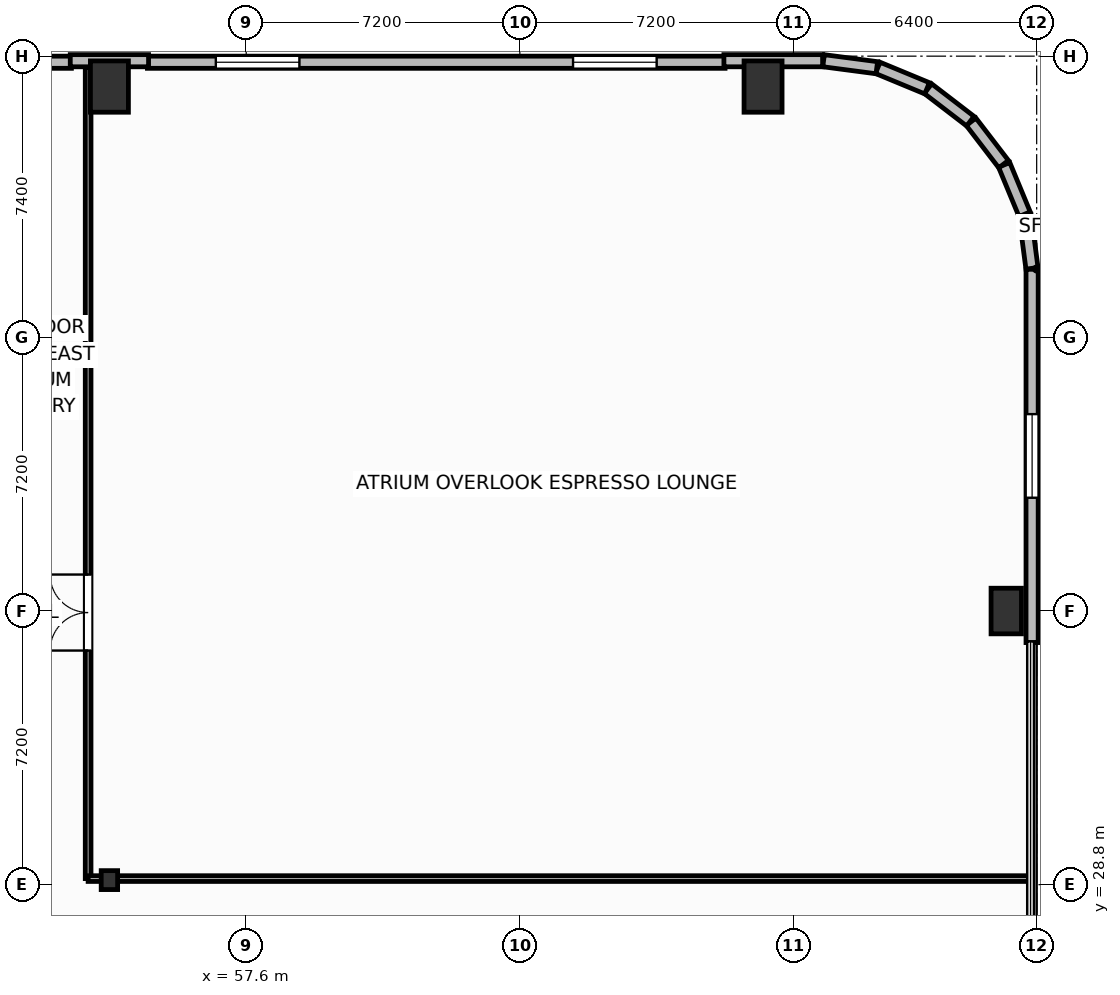
"""IFC4 building model, lengths in metres.
Left out: names, types, materials, properties, quantities, classifications, styles, units other than length and angle.
Written with IfcOpenShell. Run it as: python <this file> out.ifc"""

import sys

from ifc_helpers import new_model, si_unit, direction, frame, frame_2d, origin, origin_2d, place, context, subcontext, project, spatial, rectangle, i_section, extrude, element, fill, save


model = new_model("IFC4")
c1 = context("Model", 3, precision=1e-05, world=origin(), true_north=direction((0.0, 1.0)))
c2 = subcontext(c1, "Body", "Model", "MODEL_VIEW")
j1 = project(units=[si_unit("LENGTHUNIT", "METRE"), si_unit("PLANEANGLEUNIT", "RADIAN")], contexts=[c1])
p1 = place(None, origin())
s1 = spatial("IfcSite", under=j1, at=p1, CompositionType="ELEMENT")
p2 = place(p1, origin())
s2 = spatial("IfcBuilding", under=s1, at=p2, CompositionType="ELEMENT")
p3 = place(p2, frame((0.0, 0.0, 5.4)))
s3 = spatial("IfcBuildingStorey", under=s2, at=p3, CompositionType="ELEMENT", Elevation=5.4)
p4 = place(p3, frame((54.0, 28.92, 0.0), z_axis=(0.0, 0.0, 1.0), x_axis=(1.0, 0.0, 0.0)))
e1 = element("IfcColumn", 1, at=p4, inside=s3, PredefinedType="COLUMN", context=c2, shape_type="SweptSolid", body=[
    extrude(i_section(OverallWidth=0.432, OverallDepth=0.498, WebThickness=0.056, FlangeThickness=0.089, FilletRadius=0.025, at=origin_2d()), origin(), (0.0, 0.0, 1.0), 5.4),
])
for number, where, z_axis, x_axis in (
    (2, (54.0, 49.8, 0.0), (0.0, 0.0, 1.0), (1.0, 0.0, 0.0)),
    (3, (71.2, 49.8, 0.0), (0.0, 0.0, 1.0), (1.0, 0.0, 0.0)),
):
    element("IfcColumn", number, at=place(p3, frame(where, z_axis=z_axis, x_axis=x_axis)), inside=s3, PredefinedType="COLUMN", context=c2, shape_type="SweptSolid", body=[
        extrude(rectangle(XDim=1.0, YDim=1.35, at=origin_2d()), origin(), (0.0, 0.0, 1.0), 5.4),
    ])
p5 = place(p3, frame((77.6, 36.0, 0.0), z_axis=(0.0, 0.0, 1.0), x_axis=(1.0, 0.0, 0.0)))
e4 = element("IfcColumn", 4, at=p5, inside=s3, PredefinedType="PILASTER", context=c2, shape_type="SweptSolid", body=[
    extrude(rectangle(XDim=0.8, YDim=1.2, at=origin_2d()), origin(), (0.0, 0.0, 1.0), 5.4),
])
p6 = place(p3, frame((25.4, 50.44, 0.0), z_axis=(0.0, 0.0, 1.0), x_axis=(1.0, 0.0, 0.0)))
e5 = element("IfcWall", 5, at=p6, inside=s3, PredefinedType="SOLIDWALL", context=c2, shape_type="SweptSolid", body=[
    extrude(rectangle(XDim=27.6, YDim=0.32, at=frame_2d((13.8, 0.0))), origin(), (0.0, 0.0, 1.0), 4.07),
])
p7 = place(p6, frame((1.8, 0.0, 0.8)))
e6 = element("IfcOpeningElement", 6, at=p7, cuts=e5, PredefinedType="OPENING", context=c2, shape_type="SweptSolid", body=[
    extrude(rectangle(XDim=2.2, YDim=1.85, at=frame_2d((1.1, 0.925))), frame((0.0, 0.17, 0.0), z_axis=(0.0, -1.0, 0.0), x_axis=(1.0, 0.0, 0.0)), (0.0, 0.0, 1.0), 0.34),
])
p8 = place(p6, frame((23.6, 0.0, 0.8)))
e7 = element("IfcOpeningElement", 7, at=p8, cuts=e5, PredefinedType="OPENING", context=c2, shape_type="SweptSolid", body=[
    extrude(rectangle(XDim=2.2, YDim=1.85, at=frame_2d((1.1, 0.925))), frame((0.0, 0.17, 0.0), z_axis=(0.0, -1.0, 0.0), x_axis=(1.0, 0.0, 0.0)), (0.0, 0.0, 1.0), 0.34),
])
p9 = place(p3, frame((55.0, 50.44, 0.0), z_axis=(0.0, 0.0, 1.0), x_axis=(1.0, 0.0, 0.0)))
e8 = element("IfcWall", 8, at=p9, inside=s3, PredefinedType="SOLIDWALL", context=c2, shape_type="SweptSolid", body=[
    extrude(rectangle(XDim=15.2, YDim=0.32, at=frame_2d((7.6, 0.0))), origin(), (0.0, 0.0, 1.0), 4.07),
])
p10 = place(p9, frame((1.8, 0.0, 0.8)))
e9 = element("IfcOpeningElement", 9, at=p10, cuts=e8, PredefinedType="OPENING", context=c2, shape_type="SweptSolid", body=[
    extrude(rectangle(XDim=2.2, YDim=1.85, at=frame_2d((1.1, 0.925))), frame((0.0, 0.17, 0.0), z_axis=(0.0, -1.0, 0.0), x_axis=(1.0, 0.0, 0.0)), (0.0, 0.0, 1.0), 0.34),
])
p11 = place(p9, frame((11.2, 0.0, 0.8)))
e10 = element("IfcOpeningElement", 10, at=p11, cuts=e8, PredefinedType="OPENING", context=c2, shape_type="SweptSolid", body=[
    extrude(rectangle(XDim=2.2, YDim=1.85, at=frame_2d((1.1, 0.925))), frame((0.0, 0.17, 0.0), z_axis=(0.0, -1.0, 0.0), x_axis=(1.0, 0.0, 0.0)), (0.0, 0.0, 1.0), 0.34),
])
p12 = place(p3, frame((78.28, 35.17, 0.0), z_axis=(0.0, 0.0, 1.0), x_axis=(0.0, 1.0, 0.0)))
e11 = element("IfcWall", 11, at=p12, inside=s3, PredefinedType="SOLIDWALL", context=c2, shape_type="SweptSolid", body=[
    extrude(rectangle(XDim=9.822, YDim=0.32, at=frame_2d((4.911, 0.0))), origin(), (0.0, 0.0, 1.0), 4.07),
])
p13 = place(p12, frame((3.811, 0.0, 0.8)))
e12 = element("IfcOpeningElement", 12, at=p13, cuts=e11, PredefinedType="OPENING", context=c2, shape_type="SweptSolid", body=[
    extrude(rectangle(XDim=2.2, YDim=2.0, at=frame_2d((1.1, 1.0))), frame((0.0, 0.17, 0.0), z_axis=(0.0, -1.0, 0.0), x_axis=(1.0, 0.0, 0.0)), (0.0, 0.0, 1.0), 0.34),
])
p14 = place(p3, frame((78.277, 45.017, 0.0), z_axis=(0.0, 0.0, 1.0), x_axis=(-0.130409831203, 0.991460173646, 0.0)))
e13 = element("IfcWall", 13, at=p14, inside=s3, PredefinedType="SOLIDWALL", context=c2, shape_type="SweptSolid", body=[
    extrude(rectangle(XDim=1.413, YDim=0.32, at=frame_2d((0.707, 0.0))), origin(), (0.0, 0.0, 1.0), 4.07),
])
for number, where, z_axis, x_axis in (
    (14, (78.083, 46.441, 0.0), (0.0, 0.0, 1.0), (-0.383, 0.924, 0.0)),
    (15, (77.53, 47.759, 0.0), (0.0, 0.0, 1.0), (-0.609, 0.793, 0.0)),
    (16, (76.654, 48.889, 0.0), (0.0, 0.0, 1.0), (-0.793, 0.609, 0.0)),
    (17, (75.516, 49.754, 0.0), (0.0, 0.0, 1.0), (-0.924, 0.383, 0.0)),
):
    element("IfcWall", number, at=place(p3, frame(where, z_axis=z_axis, x_axis=x_axis)), inside=s3, PredefinedType="SOLIDWALL", context=c2, shape_type="SweptSolid", body=[
        extrude(rectangle(XDim=1.405, YDim=0.32, at=frame_2d((0.703, 0.0))), origin(), (0.0, 0.0, 1.0), 4.07),
    ])
p15 = place(p3, frame((74.193, 50.296, 0.0), z_axis=(0.0, 0.0, 1.0), x_axis=(-0.991460173646, 0.130409831203, 0.0)))
e18 = element("IfcWall", 18, at=p15, inside=s3, PredefinedType="SOLIDWALL", context=c2, shape_type="SweptSolid", body=[
    extrude(rectangle(XDim=1.413, YDim=0.32, at=frame_2d((0.707, 0.0))), origin(), (0.0, 0.0, 1.0), 4.07),
])
p16 = place(p3, frame((72.767, 50.48, 0.0), z_axis=(0.0, 0.0, 1.0), x_axis=(-1.0, 0.0, 0.0)))
e19 = element("IfcWall", 19, at=p16, inside=s3, PredefinedType="SOLIDWALL", context=c2, shape_type="SweptSolid", body=[
    extrude(rectangle(XDim=2.597, YDim=0.32, at=frame_2d((1.299, 0.0))), origin(), (0.0, 0.0, 1.0), 4.07),
])
p17 = place(p3, frame((55.03, 50.48, 0.0), z_axis=(0.0, 0.0, 1.0), x_axis=(-1.0, 0.0, 0.0)))
e20 = element("IfcWall", 20, at=p17, inside=s3, PredefinedType="SOLIDWALL", context=c2, shape_type="SweptSolid", body=[
    extrude(rectangle(XDim=2.06, YDim=0.32, at=frame_2d((1.03, 0.0))), origin(), (0.0, 0.0, 1.0), 4.07),
])
p18 = place(p3, frame((53.44, 28.96, 0.0), z_axis=(0.0, 0.0, 1.0), x_axis=(0.0, 1.0, 0.0)))
e21 = element("IfcWall", 21, at=p18, inside=s3, PredefinedType="PARTITIONING", context=c2, shape_type="SweptSolid", body=[
    extrude(rectangle(XDim=21.34, YDim=0.15, at=frame_2d((10.67, 0.0))), origin(), (0.0, 0.0, 1.0), 5.12),
])
p19 = place(p18, frame((6.0, 0.0, 0.0)))
e22 = element("IfcOpeningElement", 22, at=p19, cuts=e21, PredefinedType="OPENING", context=c2, shape_type="SweptSolid", body=[
    extrude(rectangle(XDim=2.0, YDim=2.05, at=frame_2d((1.0, 1.025))), frame((0.0, 0.085, 0.0), z_axis=(0.0, -1.0, 0.0), x_axis=(1.0, 0.0, 0.0)), (0.0, 0.0, 1.0), 0.17),
])
p20 = place(p3, frame((53.44, 28.96, 0.0), z_axis=(0.0, 0.0, 1.0), x_axis=(1.0, 0.0, 0.0)))
e23 = element("IfcWall", 23, at=p20, inside=s3, PredefinedType="PARTITIONING", context=c2, shape_type="SweptSolid", body=[
    extrude(rectangle(XDim=24.76, YDim=0.15, at=frame_2d((12.38, 0.0))), origin(), (0.0, 0.0, 1.0), 4.332),
])
p21 = place(p10, origin())
e24 = element("IfcWindow", 24, at=p21, inside=s3, PartitioningType="SINGLE_PANEL", PredefinedType="WINDOW", context=c2, shape_type="SweptSolid", body=[
    extrude(rectangle(XDim=2.2, YDim=1.85, at=frame_2d((1.1, 0.925))), frame((0.0, 0.03, 0.0), z_axis=(0.0, -1.0, 0.0), x_axis=(1.0, 0.0, 0.0)), (0.0, 0.0, 1.0), 0.06),
])
fill(e9, e24)
p22 = place(p11, origin())
e25 = element("IfcWindow", 25, at=p22, inside=s3, PartitioningType="SINGLE_PANEL", PredefinedType="WINDOW", context=c2, shape_type="SweptSolid", body=[
    extrude(rectangle(XDim=2.2, YDim=1.85, at=frame_2d((1.1, 0.925))), frame((0.0, 0.03, 0.0), z_axis=(0.0, -1.0, 0.0), x_axis=(1.0, 0.0, 0.0)), (0.0, 0.0, 1.0), 0.06),
])
fill(e10, e25)
p23 = place(p13, origin())
e26 = element("IfcWindow", 26, at=p23, inside=s3, PartitioningType="SINGLE_PANEL", PredefinedType="WINDOW", context=c2, shape_type="SweptSolid", body=[
    extrude(rectangle(XDim=2.2, YDim=2.0, at=frame_2d((1.1, 1.0))), frame((0.0, 0.03, 0.0), z_axis=(0.0, -1.0, 0.0), x_axis=(1.0, 0.0, 0.0)), (0.0, 0.0, 1.0), 0.06),
])
fill(e12, e26)
p24 = place(p19, origin())
e27 = element("IfcDoor", 27, at=p24, inside=s3, OperationType="DOUBLE_DOOR_SINGLE_SWING", PredefinedType="DOOR", context=c2, shape_type="SweptSolid", body=[
    extrude(rectangle(XDim=2.0, YDim=2.05, at=frame_2d((1.0, 1.025))), frame((0.0, 0.025, 0.0), z_axis=(0.0, -1.0, 0.0), x_axis=(1.0, 0.0, 0.0)), (0.0, 0.0, 1.0), 0.05),
])
fill(e22, e27)
save(model, sys.argv[1])
